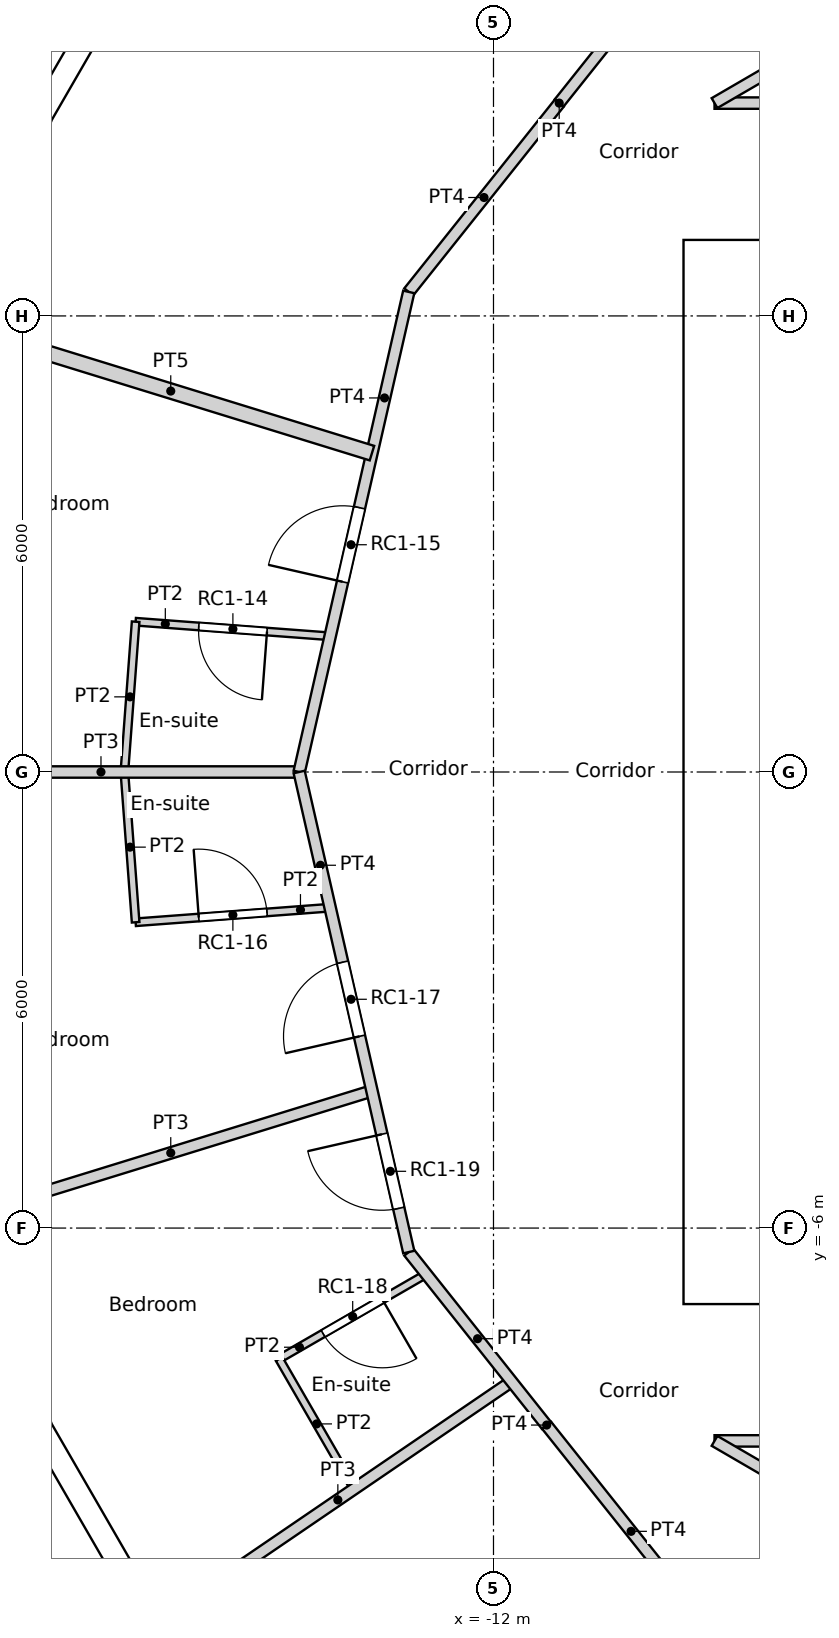
"""IFC4 building model, lengths in metres.
Left out: names, types, materials, properties, quantities, classifications, styles, units other than length and angle.
Written with IfcOpenShell. Run it as: python <this file> out.ifc"""

import sys

from ifc_helpers import new_model, si_unit, direction, frame, frame_2d, origin, origin_2d, place, context, subcontext, project, spatial, rectangle, circle, extrude, element, fill, save


model = new_model("IFC4")
c1 = context("Model", 3, precision=1e-05, world=origin(), true_north=direction((0.0, 1.0)))
c2 = subcontext(c1, "Body", "Model", "MODEL_VIEW")
j1 = project(units=[si_unit("LENGTHUNIT", "METRE"), si_unit("PLANEANGLEUNIT", "RADIAN")], contexts=[c1])
p1 = place(None, origin())
s1 = spatial("IfcSite", under=j1, at=p1, CompositionType="ELEMENT")
p2 = place(p1, origin())
s2 = spatial("IfcBuilding", under=s1, at=p2, CompositionType="ELEMENT")
p3 = place(p2, frame((0.0, 0.0, 231.0)))
s3 = spatial("IfcBuildingStorey", under=s2, at=p3, CompositionType="ELEMENT", Elevation=231.0)
for number, where, z_axis, x_axis in (
    (1, (-16.958, 8.167, 0.0), (0.0, 0.0, 1.0), (1.0, 0.0, 0.0)),
    (2, (-16.958, -8.167, 0.0), (0.0, 0.0, 1.0), (1.0, 0.0, 0.0)),
):
    element("IfcColumn", number, at=place(p3, frame(where, z_axis=z_axis, x_axis=x_axis)), inside=s3, PredefinedType="COLUMN", context=c2, shape_type="SweptSolid", body=[
        extrude(circle(Radius=0.55, at=origin_2d()), origin(), (0.0, 0.0, 1.0), 3.6),
    ])
p4 = place(p3, frame((-16.468, 11.209, 0.0), z_axis=(0.0, 0.0, 1.0), x_axis=(-0.500012570604, -0.866018146021, 0.0)))
e3 = element("IfcWall", 3, at=p4, inside=s3, PredefinedType="SOLIDWALL", context=c2, shape_type="SweptSolid", body=[
    extrude(rectangle(XDim=2.962, YDim=0.3, at=frame_2d((1.481, 0.0))), origin(), (0.0, 0.0, 1.0), 2.8),
])
p5 = place(p4, frame((1.481, 0.0, 1.55)))
e4 = element("IfcOpeningElement", 4, at=p5, cuts=e3, PredefinedType="OPENING", context=c2, shape_type="SweptSolid", body=[
    extrude(circle(Radius=0.9, at=origin_2d()), frame((0.0, 0.16, 0.0), z_axis=(0.0, -1.0, 0.0), x_axis=(1.0, 0.0, 0.0)), (0.0, 0.0, 1.0), 0.32),
])
p6 = place(p3, frame((-17.949, -8.644, 0.0), z_axis=(0.0, 0.0, 1.0), x_axis=(0.500012570604, -0.866018146021, 0.0)))
e5 = element("IfcWall", 5, at=p6, inside=s3, PredefinedType="SOLIDWALL", context=c2, shape_type="SweptSolid", body=[
    extrude(rectangle(XDim=2.962, YDim=0.3, at=frame_2d((1.481, 0.0))), origin(), (0.0, 0.0, 1.0), 3.25),
])
p7 = place(p6, frame((1.481, 0.0, 1.55)))
e6 = element("IfcOpeningElement", 6, at=p7, cuts=e5, PredefinedType="OPENING", context=c2, shape_type="SweptSolid", body=[
    extrude(circle(Radius=0.9, at=origin_2d()), frame((0.0, 0.16, 0.0), z_axis=(0.0, -1.0, 0.0), x_axis=(1.0, 0.0, 0.0)), (0.0, 0.0, 1.0), 0.32),
])
p8 = place(p3, frame((-9.5, -6.7, 0.0), z_axis=(0.0, 0.0, 1.0), x_axis=(1.0, 0.0, 0.0)))
e7 = element("IfcWall", 7, at=p8, inside=s3, PredefinedType="SOLIDWALL", context=c2, shape_type="SweptSolid", body=[
    extrude(rectangle(XDim=19.0, YDim=0.6, at=frame_2d((9.5, 0.0))), origin(), (0.0, 0.0, 1.0), 3.6),
])
p9 = place(p8, frame((10.4, 0.0, 0.0)))
e8 = element("IfcOpeningElement", 8, at=p9, cuts=e7, PredefinedType="OPENING", context=c2, shape_type="SweptSolid", body=[
    extrude(rectangle(XDim=1.0, YDim=2.1, at=frame_2d((0.5, 1.05))), frame((0.0, 0.3, 0.0), z_axis=(0.0, -1.0, 0.0), x_axis=(1.0, 0.0, 0.0)), (0.0, 0.0, 1.0), 0.6),
])
p10 = place(p8, frame((5.35, 0.0, 0.0)))
e9 = element("IfcOpeningElement", 9, at=p10, cuts=e7, PredefinedType="OPENING", context=c2, shape_type="SweptSolid", body=[
    extrude(rectangle(XDim=1.7, YDim=2.1, at=frame_2d((0.85, 1.05))), frame((0.0, 0.3, 0.0), z_axis=(0.0, -1.0, 0.0), x_axis=(1.0, 0.0, 0.0)), (0.0, 0.0, 1.0), 0.6),
])
p11 = place(p8, frame((11.95, 0.0, 0.0)))
e10 = element("IfcOpeningElement", 10, at=p11, cuts=e7, PredefinedType="OPENING", context=c2, shape_type="SweptSolid", body=[
    extrude(rectangle(XDim=1.7, YDim=2.1, at=frame_2d((0.85, 1.05))), frame((0.0, 0.3, 0.0), z_axis=(0.0, -1.0, 0.0), x_axis=(1.0, 0.0, 0.0)), (0.0, 0.0, 1.0), 0.6),
])
p12 = place(p3, frame((-9.5, 6.7, 0.0), z_axis=(0.0, 0.0, 1.0), x_axis=(1.0, 0.0, 0.0)))
e11 = element("IfcWall", 11, at=p12, inside=s3, PredefinedType="SOLIDWALL", context=c2, shape_type="SweptSolid", body=[
    extrude(rectangle(XDim=19.0, YDim=0.6, at=frame_2d((9.5, 0.0))), origin(), (0.0, 0.0, 1.0), 3.6),
])
p13 = place(p12, frame((5.35, 0.0, 0.0)))
e12 = element("IfcOpeningElement", 12, at=p13, cuts=e11, PredefinedType="OPENING", context=c2, shape_type="SweptSolid", body=[
    extrude(rectangle(XDim=1.7, YDim=2.1, at=frame_2d((0.85, 1.05))), frame((0.0, 0.3, 0.0), z_axis=(0.0, -1.0, 0.0), x_axis=(1.0, 0.0, 0.0)), (0.0, 0.0, 1.0), 0.6),
])
p14 = place(p3, frame((-9.2, -6.4, 0.0), z_axis=(0.0, 0.0, 1.0), x_axis=(0.0, 1.0, 0.0)))
e13 = element("IfcWall", 13, at=p14, inside=s3, PredefinedType="SOLIDWALL", context=c2, shape_type="SweptSolid", body=[
    extrude(rectangle(XDim=12.8, YDim=0.6, at=frame_2d((6.4, 0.0))), origin(), (0.0, 0.0, 1.0), 3.6),
])
p15 = place(p3, frame((-8.9, -3.1, 0.0), z_axis=(0.0, 0.0, 1.0), x_axis=(1.0, 0.0, 0.0)))
e14 = element("IfcWall", 14, at=p15, inside=s3, PredefinedType="SOLIDWALL", context=c2, shape_type="SweptSolid", body=[
    extrude(rectangle(XDim=9.6, YDim=0.3, at=frame_2d((4.8, 0.0))), origin(), (0.0, 0.0, 1.0), 3.25),
])
p16 = place(p15, frame((4.75, 0.0, 0.0)))
e15 = element("IfcOpeningElement", 15, at=p16, cuts=e14, PredefinedType="OPENING", context=c2, shape_type="SweptSolid", body=[
    extrude(rectangle(XDim=1.7, YDim=2.1, at=frame_2d((0.85, 1.05))), frame((0.0, 0.15, 0.0), z_axis=(0.0, -1.0, 0.0), x_axis=(1.0, 0.0, 0.0)), (0.0, 0.0, 1.0), 0.3),
])
p17 = place(p3, frame((-8.9, 3.1, 0.0), z_axis=(0.0, 0.0, 1.0), x_axis=(1.0, 0.0, 0.0)))
e16 = element("IfcWall", 16, at=p17, inside=s3, PredefinedType="SOLIDWALL", context=c2, shape_type="SweptSolid", body=[
    extrude(rectangle(XDim=4.55, YDim=0.3, at=frame_2d((2.275, 0.0))), origin(), (0.0, 0.0, 1.0), 3.25),
])
p18 = place(p3, frame((-8.9, 0.0, 0.0), z_axis=(0.0, 0.0, 1.0), x_axis=(1.0, 0.0, 0.0)))
e17 = element("IfcWall", 17, at=p18, inside=s3, PredefinedType="SOLIDWALL", context=c2, shape_type="SweptSolid", body=[
    extrude(rectangle(XDim=3.0, YDim=0.3, at=frame_2d((1.5, 0.0))), origin(), (0.0, 0.0, 1.0), 3.25),
])
p19 = place(p3, frame((-9.092, 8.8, 0.0), z_axis=(0.0, 0.0, 1.0), x_axis=(0.864470922103, 0.502682827277, 0.0)))
e18 = element("IfcWall", 18, at=p19, inside=s3, PredefinedType="PARTITIONING", context=c2, shape_type="SweptSolid", body=[
    extrude(rectangle(XDim=6.735, YDim=0.15, at=frame_2d((3.368, 0.0))), origin(), (0.0, 0.0, 1.0), 3.25),
])
p20 = place(p3, frame((-9.092, 8.8, 0.0), z_axis=(0.0, 0.0, 1.0), x_axis=(1.0, 0.0, 0.0)))
e19 = element("IfcWall", 19, at=p20, inside=s3, PredefinedType="PARTITIONING", context=c2, shape_type="SweptSolid", body=[
    extrude(rectangle(XDim=8.196, YDim=0.15, at=frame_2d((4.098, 0.0))), origin(), (0.0, 0.0, 1.0), 3.25),
])
p21 = place(p20, frame((3.598, 0.0, 0.0)))
e20 = element("IfcOpeningElement", 20, at=p21, cuts=e19, PredefinedType="OPENING", context=c2, shape_type="SweptSolid", body=[
    extrude(rectangle(XDim=1.0, YDim=2.04, at=frame_2d((0.5, 1.02))), frame((0.0, 0.075, 0.0), z_axis=(0.0, -1.0, 0.0), x_axis=(1.0, 0.0, 0.0)), (0.0, 0.0, 1.0), 0.15),
])
p22 = place(p3, frame((-11.134, 8.8, 0.0), z_axis=(0.0, 0.0, 1.0), x_axis=(-1.0, 0.0, 0.0)))
e21 = element("IfcWall", 21, at=p22, inside=s3, PredefinedType="PARTITIONING", context=c2, shape_type="SweptSolid", body=[
    extrude(rectangle(XDim=0.003, YDim=0.15, at=frame_2d((0.001, 0.0))), origin(), (0.0, 0.0, 1.0), 3.25),
])
p23 = place(p3, frame((-11.136, 8.802, 0.0), z_axis=(0.0, 0.0, 1.0), x_axis=(0.623151397235, 0.782101231379, 0.0)))
e22 = element("IfcWall", 22, at=p23, inside=s3, PredefinedType="PARTITIONING", context=c2, shape_type="SweptSolid", body=[
    extrude(rectangle(XDim=3.301, YDim=0.15, at=frame_2d((1.65, 0.0))), origin(), (0.0, 0.0, 1.0), 3.25),
])
p24 = place(p3, frame((-9.092, -8.8, 0.0), z_axis=(0.0, 0.0, 1.0), x_axis=(1.0, 0.0, 0.0)))
e23 = element("IfcWall", 23, at=p24, inside=s3, PredefinedType="PARTITIONING", context=c2, shape_type="SweptSolid", body=[
    extrude(rectangle(XDim=8.196, YDim=0.15, at=frame_2d((4.098, 0.0))), origin(), (0.0, 0.0, 1.0), 3.25),
])
p25 = place(p24, frame((3.598, 0.0, 0.0)))
e24 = element("IfcOpeningElement", 24, at=p25, cuts=e23, PredefinedType="OPENING", context=c2, shape_type="SweptSolid", body=[
    extrude(rectangle(XDim=1.0, YDim=2.04, at=frame_2d((0.5, 1.02))), frame((0.0, 0.075, 0.0), z_axis=(0.0, -1.0, 0.0), x_axis=(1.0, 0.0, 0.0)), (0.0, 0.0, 1.0), 0.15),
])
p26 = place(p3, frame((-9.092, -8.8, 0.0), z_axis=(0.0, 0.0, 1.0), x_axis=(0.864470922103, -0.502682827277, 0.0)))
e25 = element("IfcWall", 25, at=p26, inside=s3, PredefinedType="PARTITIONING", context=c2, shape_type="SweptSolid", body=[
    extrude(rectangle(XDim=6.735, YDim=0.15, at=frame_2d((3.368, 0.0))), origin(), (0.0, 0.0, 1.0), 3.25),
])
p27 = place(p3, frame((-11.3, -8.596, 0.0), z_axis=(0.0, 0.0, 1.0), x_axis=(0.623165080354, -0.782090328944, 0.0)))
e26 = element("IfcWall", 26, at=p27, inside=s3, PredefinedType="PARTITIONING", context=c2, shape_type="SweptSolid", body=[
    extrude(rectangle(XDim=3.564, YDim=0.15, at=frame_2d((1.782, 0.0))), origin(), (0.0, 0.0, 1.0), 3.25),
])
p28 = place(p3, frame((-11.3, -8.596, 0.0), z_axis=(0.0, 0.0, 1.0), x_axis=(0.0, 1.0, 0.0)))
e27 = element("IfcWall", 27, at=p28, inside=s3, PredefinedType="PARTITIONING", context=c2, shape_type="SweptSolid", body=[
    extrude(rectangle(XDim=0.009, YDim=0.15, at=frame_2d((0.005, 0.0))), origin(), (0.0, 0.0, 1.0), 3.25),
])
p29 = place(p3, frame((-14.557, 0.0, 0.0), z_axis=(0.0, 0.0, 1.0), x_axis=(0.222533159771, 0.974925121639, 0.0)))
e28 = element("IfcWall", 28, at=p29, inside=s3, PredefinedType="PARTITIONING", context=c2, shape_type="SweptSolid", body=[
    extrude(rectangle(XDim=6.478, YDim=0.15, at=frame_2d((3.239, 0.0))), origin(), (0.0, 0.0, 1.0), 3.25),
])
p30 = place(p29, frame((2.567, 0.0, 0.0)))
e29 = element("IfcOpeningElement", 29, at=p30, cuts=e28, PredefinedType="OPENING", context=c2, shape_type="SweptSolid", body=[
    extrude(rectangle(XDim=1.0, YDim=2.1, at=frame_2d((0.5, 1.05))), frame((0.0, 0.075, 0.0), z_axis=(0.0, -1.0, 0.0), x_axis=(1.0, 0.0, 0.0)), (0.0, 0.0, 1.0), 0.15),
])
p31 = place(p3, frame((-13.115, 6.316, 0.0), z_axis=(0.0, 0.0, 1.0), x_axis=(0.623476099415, 0.781842409606, 0.0)))
e30 = element("IfcWall", 30, at=p31, inside=s3, PredefinedType="PARTITIONING", context=c2, shape_type="SweptSolid", body=[
    extrude(rectangle(XDim=3.177, YDim=0.15, at=frame_2d((1.589, 0.0))), origin(), (0.0, 0.0, 1.0), 3.25),
])
p32 = place(p3, frame((-14.557, 0.0, 0.0), z_axis=(0.0, 0.0, 1.0), x_axis=(0.222568978642, -0.97491694505, 0.0)))
e31 = element("IfcWall", 31, at=p32, inside=s3, PredefinedType="PARTITIONING", context=c2, shape_type="SweptSolid", body=[
    extrude(rectangle(XDim=6.479, YDim=0.15, at=frame_2d((3.239, 0.0))), origin(), (0.0, 0.0, 1.0), 3.25),
])
p33 = place(p32, frame((2.567, 0.0, 0.0)))
e32 = element("IfcOpeningElement", 32, at=p33, cuts=e31, PredefinedType="OPENING", context=c2, shape_type="SweptSolid", body=[
    extrude(rectangle(XDim=1.0, YDim=2.1, at=frame_2d((0.5, 1.05))), frame((0.0, 0.075, 0.0), z_axis=(0.0, -1.0, 0.0), x_axis=(1.0, 0.0, 0.0)), (0.0, 0.0, 1.0), 0.15),
])
p34 = place(p32, frame((4.888, 0.0, 0.0)))
e33 = element("IfcOpeningElement", 33, at=p34, cuts=e31, PredefinedType="OPENING", context=c2, shape_type="SweptSolid", body=[
    extrude(rectangle(XDim=1.0, YDim=2.1, at=frame_2d((0.5, 1.05))), frame((0.0, 0.075, 0.0), z_axis=(0.0, -1.0, 0.0), x_axis=(1.0, 0.0, 0.0)), (0.0, 0.0, 1.0), 0.15),
])
p35 = place(p3, frame((-13.115, -6.316, 0.0), z_axis=(0.0, 0.0, 1.0), x_axis=(0.622042479172, -0.782983495423, 0.0)))
e34 = element("IfcWall", 34, at=p35, inside=s3, PredefinedType="PARTITIONING", context=c2, shape_type="SweptSolid", body=[
    extrude(rectangle(XDim=2.911, YDim=0.15, at=frame_2d((1.456, 0.0))), origin(), (0.0, 0.0, 1.0), 3.25),
])
p36 = place(p3, frame((-18.893, 5.828, 0.0), z_axis=(0.0, 0.0, 1.0), x_axis=(0.955580602693, -0.294729896274, 0.0)))
e35 = element("IfcWall", 35, at=p36, inside=s3, PredefinedType="PARTITIONING", context=c2, shape_type="SweptSolid", body=[
    extrude(rectangle(XDim=5.54, YDim=0.2, at=frame_2d((2.77, 0.0))), origin(), (0.0, 0.0, 1.0), 3.25),
])
p37 = place(p3, frame((-16.708, 1.977, 0.0), z_axis=(0.0, 0.0, 1.0), x_axis=(0.997193275785, -0.074870359477, 0.0)))
e36 = element("IfcWall", 36, at=p37, inside=s3, PredefinedType="PARTITIONING", context=c2, shape_type="SweptSolid", body=[
    extrude(rectangle(XDim=2.566, YDim=0.1, at=frame_2d((1.283, 0.0))), origin(), (0.0, 0.0, 1.0), 3.25),
])
p38 = place(p37, frame((0.833, 0.0, 0.0)))
e37 = element("IfcOpeningElement", 37, at=p38, cuts=e36, PredefinedType="OPENING", context=c2, shape_type="SweptSolid", body=[
    extrude(rectangle(XDim=0.9, YDim=2.04, at=frame_2d((0.45, 1.02))), frame((0.0, 0.05, 0.0), z_axis=(0.0, -1.0, 0.0), x_axis=(1.0, 0.0, 0.0)), (0.0, 0.0, 1.0), 0.1),
])
p39 = place(p3, frame((-16.856, 0.0, 0.0), z_axis=(0.0, 0.0, 1.0), x_axis=(0.074624634103, 0.997211694669, 0.0)))
e38 = element("IfcWall", 38, at=p39, inside=s3, PredefinedType="PARTITIONING", context=c2, shape_type="SweptSolid", body=[
    extrude(rectangle(XDim=1.983, YDim=0.1, at=frame_2d((0.991, 0.0))), origin(), (0.0, 0.0, 1.0), 3.25),
])
p40 = place(p3, frame((-19.771, 0.0, 0.0), z_axis=(0.0, 0.0, 1.0), x_axis=(1.0, 0.0, 0.0)))
e39 = element("IfcWall", 39, at=p40, inside=s3, PredefinedType="PARTITIONING", context=c2, shape_type="SweptSolid", body=[
    extrude(rectangle(XDim=5.214, YDim=0.15, at=frame_2d((2.607, 0.0))), origin(), (0.0, 0.0, 1.0), 3.25),
])
p41 = place(p3, frame((-16.856, 0.0, 0.0), z_axis=(0.0, 0.0, 1.0), x_axis=(0.074624634103, -0.997211694669, 0.0)))
e40 = element("IfcWall", 40, at=p41, inside=s3, PredefinedType="PARTITIONING", context=c2, shape_type="SweptSolid", body=[
    extrude(rectangle(XDim=1.983, YDim=0.1, at=frame_2d((0.991, 0.0))), origin(), (0.0, 0.0, 1.0), 3.25),
])
p42 = place(p3, frame((-16.708, -1.977, 0.0), z_axis=(0.0, 0.0, 1.0), x_axis=(0.997193275785, 0.074870359477, 0.0)))
e41 = element("IfcWall", 41, at=p42, inside=s3, PredefinedType="PARTITIONING", context=c2, shape_type="SweptSolid", body=[
    extrude(rectangle(XDim=2.566, YDim=0.1, at=frame_2d((1.283, 0.0))), origin(), (0.0, 0.0, 1.0), 3.25),
])
p43 = place(p42, frame((0.833, 0.0, 0.0)))
e42 = element("IfcOpeningElement", 42, at=p43, cuts=e41, PredefinedType="OPENING", context=c2, shape_type="SweptSolid", body=[
    extrude(rectangle(XDim=0.9, YDim=2.04, at=frame_2d((0.45, 1.02))), frame((0.0, 0.05, 0.0), z_axis=(0.0, -1.0, 0.0), x_axis=(1.0, 0.0, 0.0)), (0.0, 0.0, 1.0), 0.1),
])
p44 = place(p3, frame((-18.893, -5.828, 0.0), z_axis=(0.0, 0.0, 1.0), x_axis=(0.955580602693, 0.294729896274, 0.0)))
e43 = element("IfcWall", 43, at=p44, inside=s3, PredefinedType="PARTITIONING", context=c2, shape_type="SweptSolid", body=[
    extrude(rectangle(XDim=5.54, YDim=0.15, at=frame_2d((2.77, 0.0))), origin(), (0.0, 0.0, 1.0), 3.25),
])
p45 = place(p3, frame((-14.82, -7.722, 0.0), z_axis=(0.0, 0.0, 1.0), x_axis=(0.866076416361, 0.499911633214, 0.0)))
e44 = element("IfcWall", 44, at=p45, inside=s3, PredefinedType="PARTITIONING", context=c2, shape_type="SweptSolid", body=[
    extrude(rectangle(XDim=2.234, YDim=0.1, at=frame_2d((1.117, 0.0))), origin(), (0.0, 0.0, 1.0), 3.25),
])
p46 = place(p45, frame((0.667, 0.0, 0.0)))
e45 = element("IfcOpeningElement", 45, at=p46, cuts=e44, PredefinedType="OPENING", context=c2, shape_type="SweptSolid", body=[
    extrude(rectangle(XDim=0.9, YDim=2.04, at=frame_2d((0.45, 1.02))), frame((0.0, 0.05, 0.0), z_axis=(0.0, -1.0, 0.0), x_axis=(1.0, 0.0, 0.0)), (0.0, 0.0, 1.0), 0.1),
])
p47 = place(p3, frame((-14.82, -7.722, 0.0), z_axis=(0.0, 0.0, 1.0), x_axis=(0.500143626598, -0.865942465048, 0.0)))
e46 = element("IfcWall", 46, at=p47, inside=s3, PredefinedType="PARTITIONING", context=c2, shape_type="SweptSolid", body=[
    extrude(rectangle(XDim=1.974, YDim=0.1, at=frame_2d((0.987, 0.0))), origin(), (0.0, 0.0, 1.0), 3.25),
])
p48 = place(p3, frame((-16.336, -11.138, 0.0), z_axis=(0.0, 0.0, 1.0), x_axis=(0.82615274451, 0.563446219917, 0.0)))
e47 = element("IfcWall", 47, at=p48, inside=s3, PredefinedType="PARTITIONING", context=c2, shape_type="SweptSolid", body=[
    extrude(rectangle(XDim=5.54, YDim=0.15, at=frame_2d((2.77, 0.0))), origin(), (0.0, 0.0, 1.0), 3.25),
])
p49 = place(p5, origin())
e48 = element("IfcWindow", 48, at=p49, inside=s3, PartitioningType="SINGLE_PANEL", PredefinedType="WINDOW", context=c2, shape_type="SweptSolid", body=[
    extrude(circle(Radius=0.9, at=origin_2d()), frame((0.0, 0.12, 0.0), z_axis=(0.0, -1.0, 0.0), x_axis=(1.0, 0.0, 0.0)), (0.0, 0.0, 1.0), 0.1),
])
fill(e4, e48)
p50 = place(p7, origin())
e49 = element("IfcWindow", 49, at=p50, inside=s3, PartitioningType="SINGLE_PANEL", PredefinedType="WINDOW", context=c2, shape_type="SweptSolid", body=[
    extrude(circle(Radius=0.9, at=origin_2d()), frame((0.0, 0.12, 0.0), z_axis=(0.0, -1.0, 0.0), x_axis=(1.0, 0.0, 0.0)), (0.0, 0.0, 1.0), 0.1),
])
fill(e6, e49)
p51 = place(p38, origin())
e50 = element("IfcDoor", 50, at=p51, inside=s3, OperationType="SINGLE_SWING_LEFT", PredefinedType="DOOR", context=c2, shape_type="SweptSolid", body=[
    extrude(rectangle(XDim=0.9, YDim=2.04, at=frame_2d((0.45, 1.02))), frame((0.0, 0.025, 0.0), z_axis=(0.0, -1.0, 0.0), x_axis=(1.0, 0.0, 0.0)), (0.0, 0.0, 1.0), 0.05),
])
fill(e37, e50)
p52 = place(p30, origin())
e51 = element("IfcDoor", 51, at=p52, inside=s3, OperationType="SINGLE_SWING_LEFT", PredefinedType="DOOR", context=c2, shape_type="SweptSolid", body=[
    extrude(rectangle(XDim=1.0, YDim=2.1, at=frame_2d((0.5, 1.05))), frame((0.0, 0.025, 0.0), z_axis=(0.0, -1.0, 0.0), x_axis=(1.0, 0.0, 0.0)), (0.0, 0.0, 1.0), 0.05),
])
fill(e29, e51)
p53 = place(p43, origin())
e52 = element("IfcDoor", 52, at=p53, inside=s3, OperationType="SINGLE_SWING_LEFT", PredefinedType="DOOR", context=c2, shape_type="SweptSolid", body=[
    extrude(rectangle(XDim=0.9, YDim=2.04, at=frame_2d((0.45, 1.02))), frame((0.0, 0.025, 0.0), z_axis=(0.0, -1.0, 0.0), x_axis=(1.0, 0.0, 0.0)), (0.0, 0.0, 1.0), 0.05),
])
fill(e42, e52)
p54 = place(p33, origin())
e53 = element("IfcDoor", 53, at=p54, inside=s3, OperationType="SINGLE_SWING_LEFT", PredefinedType="DOOR", context=c2, shape_type="SweptSolid", body=[
    extrude(rectangle(XDim=1.0, YDim=2.1, at=frame_2d((0.5, 1.05))), frame((0.0, 0.025, 0.0), z_axis=(0.0, -1.0, 0.0), x_axis=(1.0, 0.0, 0.0)), (0.0, 0.0, 1.0), 0.05),
])
fill(e32, e53)
p55 = place(p46, origin())
e54 = element("IfcDoor", 54, at=p55, inside=s3, OperationType="SINGLE_SWING_LEFT", PredefinedType="DOOR", context=c2, shape_type="SweptSolid", body=[
    extrude(rectangle(XDim=0.9, YDim=2.04, at=frame_2d((0.45, 1.02))), frame((0.0, 0.025, 0.0), z_axis=(0.0, -1.0, 0.0), x_axis=(1.0, 0.0, 0.0)), (0.0, 0.0, 1.0), 0.05),
])
fill(e45, e54)
p56 = place(p34, origin())
e55 = element("IfcDoor", 55, at=p56, inside=s3, OperationType="SINGLE_SWING_RIGHT", PredefinedType="DOOR", context=c2, shape_type="SweptSolid", body=[
    extrude(rectangle(XDim=1.0, YDim=2.1, at=frame_2d((0.5, 1.05))), frame((0.0, 0.025, 0.0), z_axis=(0.0, -1.0, 0.0), x_axis=(1.0, 0.0, 0.0)), (0.0, 0.0, 1.0), 0.05),
])
fill(e33, e55)
save(model, sys.argv[1])
